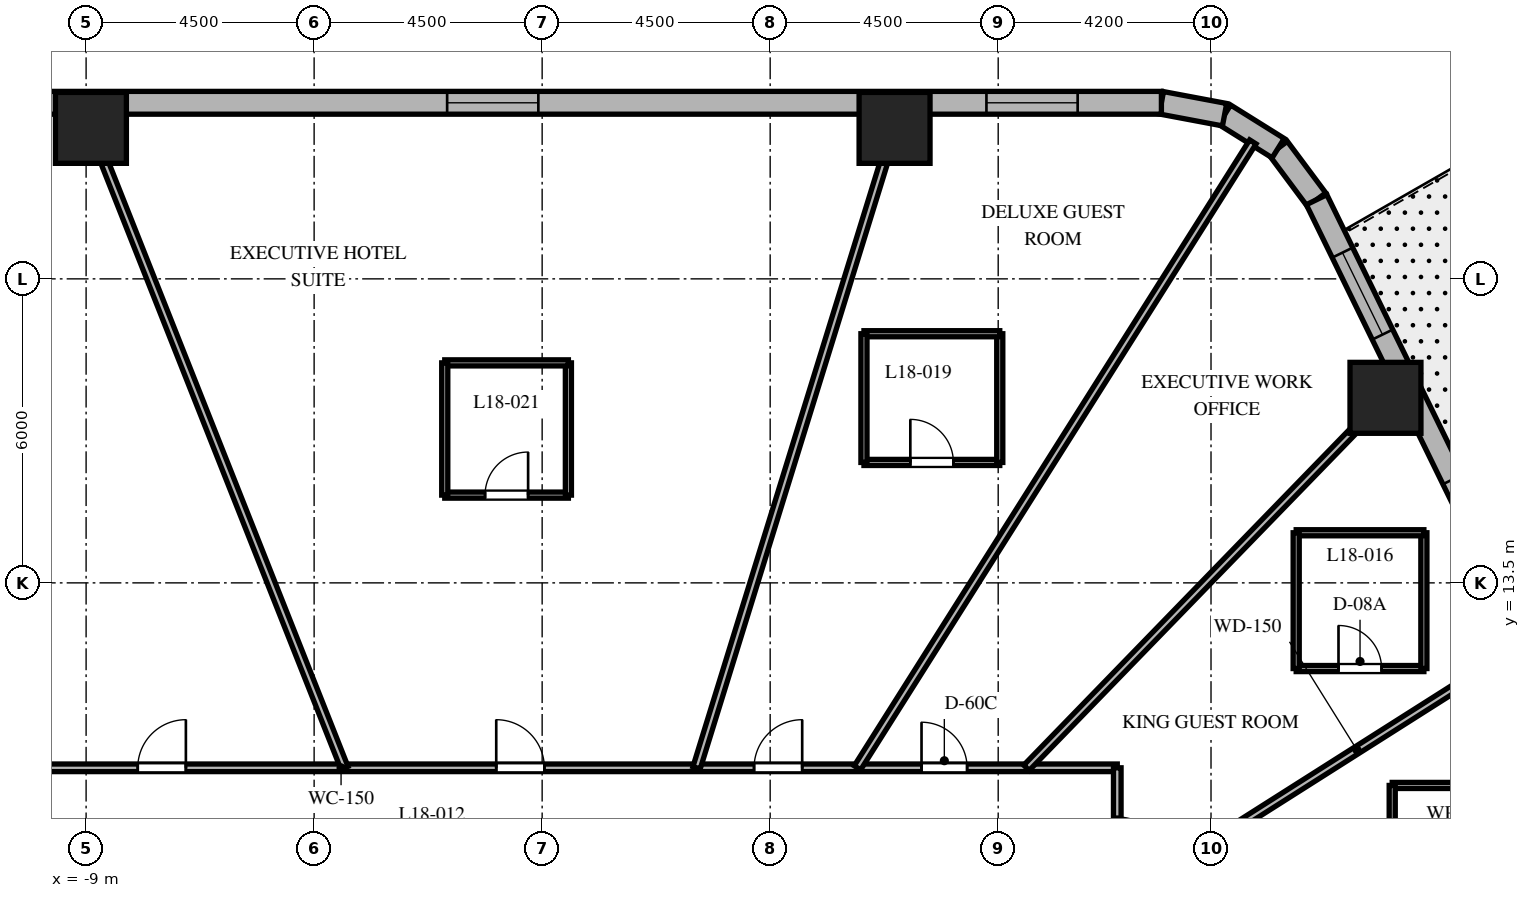
"""IFC4 building model, lengths in metres.
Left out: names, types, materials, properties, quantities, classifications, styles, units other than length and angle.
Written with IfcOpenShell. Run it as: python <this file> out.ifc"""

import sys

from ifc_helpers import new_model, si_unit, direction, frame, frame_2d, origin, origin_2d, place, context, subcontext, project, spatial, rectangle, extrude, element, fill, save


model = new_model("IFC4")
c1 = context("Model", 3, precision=1e-05, world=origin(), true_north=direction((0.0, 1.0)))
c2 = subcontext(c1, "Body", "Model", "MODEL_VIEW")
j1 = project(units=[si_unit("LENGTHUNIT", "METRE"), si_unit("PLANEANGLEUNIT", "RADIAN")], contexts=[c1])
p1 = place(None, origin())
s1 = spatial("IfcSite", under=j1, at=p1, CompositionType="ELEMENT")
p2 = place(p1, origin())
s2 = spatial("IfcBuilding", under=s1, at=p2, CompositionType="ELEMENT")
p3 = place(p2, frame((0.0, 0.0, 78.6)))
s3 = spatial("IfcBuildingStorey", under=s2, at=p3, CompositionType="ELEMENT", Elevation=78.6)
for number, where, z_axis, x_axis in (
    (1, (16.643, 17.152, 0.0), (0.0, 0.0, 1.0), (1.0, 0.0, 0.0)),
    (2, (6.955, 22.48, 0.0), (0.0, 0.0, 1.0), (1.0, 0.0, 0.0)),
    (3, (-8.905, 22.48, 0.0), (0.0, 0.0, 1.0), (1.0, 0.0, 0.0)),
):
    element("IfcColumn", number, at=place(p3, frame(where, z_axis=z_axis, x_axis=x_axis)), inside=s3, PredefinedType="COLUMN", context=c2, shape_type="SweptSolid", body=[
        extrude(rectangle(XDim=1.4, YDim=1.4, at=origin_2d()), origin(), (0.0, 0.0, 1.0), 3.7),
    ])
p4 = place(p3, frame((15.284, 21.062, 0.0), z_axis=(0.0, 0.0, 1.0), x_axis=(-0.597595366449, 0.801797841104, 0.0)))
e4 = element("IfcWall", 4, at=p4, inside=s3, PredefinedType="SOLIDWALL", context=c2, shape_type="SweptSolid", body=[
    extrude(rectangle(XDim=1.269, YDim=0.45, at=frame_2d((0.634, 0.0))), origin(), (0.0, 0.0, 1.0), 3.4),
])
p5 = place(p3, frame((14.526, 22.08, 0.0), z_axis=(0.0, 0.0, 1.0), x_axis=(-0.848185203596, 0.529699783275, 0.0)))
e5 = element("IfcWall", 5, at=p5, inside=s3, PredefinedType="SOLIDWALL", context=c2, shape_type="SweptSolid", body=[
    extrude(rectangle(XDim=1.247, YDim=0.45, at=frame_2d((0.624, 0.0))), origin(), (0.0, 0.0, 1.0), 3.4),
])
p6 = place(p3, frame((13.468, 22.74, 0.0), z_axis=(0.0, 0.0, 1.0), x_axis=(-0.982717174228, 0.185113358451, 0.0)))
e6 = element("IfcWall", 6, at=p6, inside=s3, PredefinedType="SOLIDWALL", context=c2, shape_type="SweptSolid", body=[
    extrude(rectangle(XDim=1.269, YDim=0.45, at=frame_2d((0.634, 0.0))), origin(), (0.0, 0.0, 1.0), 3.4),
])
p7 = place(p3, frame((24.336, 2.532, 0.0), z_axis=(0.0, 0.0, 1.0), x_axis=(-0.438931326393, 0.898520612291, 0.0)))
e7 = element("IfcWall", 7, at=p7, inside=s3, PredefinedType="SOLIDWALL", context=c2, shape_type="SweptSolid", body=[
    extrude(rectangle(XDim=20.623, YDim=0.45, at=frame_2d((10.312, 0.0))), origin(), (0.0, 0.0, 1.0), 3.4),
])
p8 = place(p7, frame((5.171, 0.0, 0.0)))
e8 = element("IfcOpeningElement", 8, at=p8, cuts=e7, PredefinedType="OPENING", context=c2, shape_type="SweptSolid", body=[
    extrude(rectangle(XDim=1.0, YDim=2.15, at=frame_2d((0.5, 1.075))), frame((0.0, 0.235, 0.0), z_axis=(0.0, -1.0, 0.0), x_axis=(1.0, 0.0, 0.0)), (0.0, 0.0, 1.0), 0.47),
])
p9 = place(p7, frame((6.842, 0.0, 0.8)))
e9 = element("IfcOpeningElement", 9, at=p9, cuts=e7, PredefinedType="OPENING", context=c2, shape_type="SweptSolid", body=[
    extrude(rectangle(XDim=1.8, YDim=1.8, at=frame_2d((0.9, 0.9))), frame((0.0, 0.235, 0.0), z_axis=(0.0, -1.0, 0.0), x_axis=(1.0, 0.0, 0.0)), (0.0, 0.0, 1.0), 0.47),
])
p10 = place(p7, frame((12.683, 0.0, 0.8)))
e10 = element("IfcOpeningElement", 10, at=p10, cuts=e7, PredefinedType="OPENING", context=c2, shape_type="SweptSolid", body=[
    extrude(rectangle(XDim=1.8, YDim=1.8, at=frame_2d((0.9, 0.9))), frame((0.0, 0.235, 0.0), z_axis=(0.0, -1.0, 0.0), x_axis=(1.0, 0.0, 0.0)), (0.0, 0.0, 1.0), 0.47),
])
p11 = place(p7, frame((17.66, 0.0, 0.8)))
e11 = element("IfcOpeningElement", 11, at=p11, cuts=e7, PredefinedType="OPENING", context=c2, shape_type="SweptSolid", body=[
    extrude(rectangle(XDim=1.8, YDim=1.8, at=frame_2d((0.9, 0.9))), frame((0.0, 0.235, 0.0), z_axis=(0.0, -1.0, 0.0), x_axis=(1.0, 0.0, 0.0)), (0.0, 0.0, 1.0), 0.47),
])
p12 = place(p7, frame((1.214, 0.0, 0.8)))
e12 = element("IfcOpeningElement", 12, at=p12, cuts=e7, PredefinedType="OPENING", context=c2, shape_type="SweptSolid", body=[
    extrude(rectangle(XDim=1.8, YDim=1.8, at=frame_2d((0.9, 0.9))), frame((0.0, 0.235, 0.0), z_axis=(0.0, -1.0, 0.0), x_axis=(1.0, 0.0, 0.0)), (0.0, 0.0, 1.0), 0.47),
])
p13 = place(p3, frame((12.221, 22.975, 0.0), z_axis=(0.0, 0.0, 1.0), x_axis=(-1.0, 0.0, 0.0)))
e13 = element("IfcWall", 13, at=p13, inside=s3, PredefinedType="SOLIDWALL", context=c2, shape_type="SweptSolid", body=[
    extrude(rectangle(XDim=26.389, YDim=0.45, at=frame_2d((13.195, 0.0))), origin(), (0.0, 0.0, 1.0), 3.4),
])
p14 = place(p13, frame((1.653, 0.0, 0.8)))
e14 = element("IfcOpeningElement", 14, at=p14, cuts=e13, PredefinedType="OPENING", context=c2, shape_type="SweptSolid", body=[
    extrude(rectangle(XDim=1.8, YDim=1.8, at=frame_2d((0.9, 0.9))), frame((0.0, 0.235, 0.0), z_axis=(0.0, -1.0, 0.0), x_axis=(1.0, 0.0, 0.0)), (0.0, 0.0, 1.0), 0.47),
])
p15 = place(p13, frame((12.296, 0.0, 0.8)))
e15 = element("IfcOpeningElement", 15, at=p15, cuts=e13, PredefinedType="OPENING", context=c2, shape_type="SweptSolid", body=[
    extrude(rectangle(XDim=1.8, YDim=1.8, at=frame_2d((0.9, 0.9))), frame((0.0, 0.235, 0.0), z_axis=(0.0, -1.0, 0.0), x_axis=(1.0, 0.0, 0.0)), (0.0, 0.0, 1.0), 0.47),
])
p16 = place(p13, frame((22.938, 0.0, 0.8)))
e16 = element("IfcOpeningElement", 16, at=p16, cuts=e13, PredefinedType="OPENING", context=c2, shape_type="SweptSolid", body=[
    extrude(rectangle(XDim=1.8, YDim=1.8, at=frame_2d((0.9, 0.9))), frame((0.0, 0.235, 0.0), z_axis=(0.0, -1.0, 0.0), x_axis=(1.0, 0.0, 0.0)), (0.0, 0.0, 1.0), 0.47),
])
p17 = place(p3, frame((-11.35, 9.85, 0.0), z_axis=(0.0, 0.0, 1.0), x_axis=(1.0, 0.0, 0.0)))
e17 = element("IfcWall", 17, at=p17, inside=s3, PredefinedType="PARTITIONING", context=c2, shape_type="SweptSolid", body=[
    extrude(rectangle(XDim=22.7, YDim=0.15, at=frame_2d((11.35, 0.0))), origin(), (0.0, 0.0, 1.0), 2.84),
])
p18 = place(p17, frame((18.837, 0.0, 0.0)))
e18 = element("IfcOpeningElement", 18, at=p18, cuts=e17, PredefinedType="OPENING", context=c2, shape_type="SweptSolid", body=[
    extrude(rectangle(XDim=0.9, YDim=2.03, at=frame_2d((0.45, 1.015))), frame((0.0, 0.085, 0.0), z_axis=(0.0, -1.0, 0.0), x_axis=(1.0, 0.0, 0.0)), (0.0, 0.0, 1.0), 0.17),
])
p19 = place(p17, frame((15.532, 0.0, 0.0)))
e19 = element("IfcOpeningElement", 19, at=p19, cuts=e17, PredefinedType="OPENING", context=c2, shape_type="SweptSolid", body=[
    extrude(rectangle(XDim=0.95, YDim=2.03, at=frame_2d((0.475, 1.015))), frame((0.0, 0.085, 0.0), z_axis=(0.0, -1.0, 0.0), x_axis=(1.0, 0.0, 0.0)), (0.0, 0.0, 1.0), 0.17),
])
p20 = place(p17, frame((10.444, 0.0, 0.0)))
e20 = element("IfcOpeningElement", 20, at=p20, cuts=e17, PredefinedType="OPENING", context=c2, shape_type="SweptSolid", body=[
    extrude(rectangle(XDim=0.95, YDim=2.03, at=frame_2d((0.475, 1.015))), frame((0.0, 0.085, 0.0), z_axis=(0.0, -1.0, 0.0), x_axis=(1.0, 0.0, 0.0)), (0.0, 0.0, 1.0), 0.17),
])
p21 = place(p17, frame((3.369, 0.0, 0.0)))
e21 = element("IfcOpeningElement", 21, at=p21, cuts=e17, PredefinedType="OPENING", context=c2, shape_type="SweptSolid", body=[
    extrude(rectangle(XDim=0.95, YDim=2.03, at=frame_2d((0.475, 1.015))), frame((0.0, 0.085, 0.0), z_axis=(0.0, -1.0, 0.0), x_axis=(1.0, 0.0, 0.0)), (0.0, 0.0, 1.0), 0.17),
])
p22 = place(p3, frame((11.35, 9.85, 0.0), z_axis=(0.0, 0.0, 1.0), x_axis=(0.0, -1.0, 0.0)))
e22 = element("IfcWall", 22, at=p22, inside=s3, PredefinedType="PARTITIONING", context=c2, shape_type="SweptSolid", body=[
    extrude(rectangle(XDim=19.7, YDim=0.15, at=frame_2d((9.85, 0.0))), origin(), (0.0, 0.0, 1.0), 2.84),
])
p23 = place(p22, frame((4.208, 0.0, 0.0)))
e23 = element("IfcOpeningElement", 23, at=p23, cuts=e22, PredefinedType="OPENING", context=c2, shape_type="SweptSolid", body=[
    extrude(rectangle(XDim=0.95, YDim=2.03, at=frame_2d((0.475, 1.015))), frame((0.0, 0.085, 0.0), z_axis=(0.0, -1.0, 0.0), x_axis=(1.0, 0.0, 0.0)), (0.0, 0.0, 1.0), 0.17),
])
p24 = place(p22, frame((0.97, 0.0, 0.0)))
e24 = element("IfcOpeningElement", 24, at=p24, cuts=e22, PredefinedType="OPENING", context=c2, shape_type="SweptSolid", body=[
    extrude(rectangle(XDim=0.95, YDim=2.03, at=frame_2d((0.475, 1.015))), frame((0.0, 0.085, 0.0), z_axis=(0.0, -1.0, 0.0), x_axis=(1.0, 0.0, 0.0)), (0.0, 0.0, 1.0), 0.17),
])
p25 = place(p22, frame((17.181, 0.0, 0.0)))
e25 = element("IfcOpeningElement", 25, at=p25, cuts=e22, PredefinedType="OPENING", context=c2, shape_type="SweptSolid", body=[
    extrude(rectangle(XDim=0.95, YDim=2.03, at=frame_2d((0.475, 1.015))), frame((0.0, 0.085, 0.0), z_axis=(0.0, -1.0, 0.0), x_axis=(1.0, 0.0, 0.0)), (0.0, 0.0, 1.0), 0.17),
])
p26 = place(p22, frame((13.403, 0.0, 0.0)))
e26 = element("IfcOpeningElement", 26, at=p26, cuts=e22, PredefinedType="OPENING", context=c2, shape_type="SweptSolid", body=[
    extrude(rectangle(XDim=0.95, YDim=2.03, at=frame_2d((0.475, 1.015))), frame((0.0, 0.085, 0.0), z_axis=(0.0, -1.0, 0.0), x_axis=(1.0, 0.0, 0.0)), (0.0, 0.0, 1.0), 0.17),
])
p27 = place(p22, frame((8.838, 0.0, 0.0)))
e27 = element("IfcOpeningElement", 27, at=p27, cuts=e22, PredefinedType="OPENING", context=c2, shape_type="SweptSolid", body=[
    extrude(rectangle(XDim=0.95, YDim=2.03, at=frame_2d((0.475, 1.015))), frame((0.0, 0.085, 0.0), z_axis=(0.0, -1.0, 0.0), x_axis=(1.0, 0.0, 0.0)), (0.0, 0.0, 1.0), 0.17),
])
p28 = place(p3, frame((11.35, 7.199, 0.0), z_axis=(0.0, 0.0, 1.0), x_axis=(0.844458213289, 0.535621439087, 0.0)))
e28 = element("IfcWall", 28, at=p28, inside=s3, PredefinedType="PARTITIONING", context=c2, shape_type="SweptSolid", body=[
    extrude(rectangle(XDim=9.679, YDim=0.15, at=frame_2d((4.84, 0.0))), origin(), (0.0, 0.0, 1.0), 2.54),
])
p29 = place(p3, frame((9.558, 9.85, 0.0), z_axis=(0.0, 0.0, 1.0), x_axis=(0.69638346089, 0.717669893056, 0.0)))
e29 = element("IfcWall", 29, at=p29, inside=s3, PredefinedType="PARTITIONING", context=c2, shape_type="SweptSolid", body=[
    extrude(rectangle(XDim=10.701, YDim=0.15, at=frame_2d((5.351, 0.0))), origin(), (0.0, 0.0, 1.0), 2.54),
])
p30 = place(p3, frame((6.222, 9.85, 0.0), z_axis=(0.0, 0.0, 1.0), x_axis=(0.534069056435, 0.845440857162, 0.0)))
e30 = element("IfcWall", 30, at=p30, inside=s3, PredefinedType="PARTITIONING", context=c2, shape_type="SweptSolid", body=[
    extrude(rectangle(XDim=14.611, YDim=0.15, at=frame_2d((7.306, 0.0))), origin(), (0.0, 0.0, 1.0), 2.54),
])
p31 = place(p3, frame((3.048, 9.85, 0.0), z_axis=(0.0, 0.0, 1.0), x_axis=(0.295553992761, 0.955326037206, 0.0)))
e31 = element("IfcWall", 31, at=p31, inside=s3, PredefinedType="PARTITIONING", context=c2, shape_type="SweptSolid", body=[
    extrude(rectangle(XDim=13.739, YDim=0.15, at=frame_2d((6.869, 0.0))), origin(), (0.0, 0.0, 1.0), 2.54),
])
p32 = place(p3, frame((-3.902, 9.85, 0.0), z_axis=(0.0, 0.0, 1.0), x_axis=(-0.36828765711, 0.929711891728, 0.0)))
e32 = element("IfcWall", 32, at=p32, inside=s3, PredefinedType="PARTITIONING", context=c2, shape_type="SweptSolid", body=[
    extrude(rectangle(XDim=14.117, YDim=0.15, at=frame_2d((7.059, 0.0))), origin(), (0.0, 0.0, 1.0), 2.54),
])
p33 = place(p3, frame((19.216, 9.502, 0.0), z_axis=(0.0, 0.0, 1.0), x_axis=(-1.0, 0.0, 0.0)))
e33 = element("IfcWall", 33, at=p33, inside=s3, PredefinedType="PARTITIONING", context=c2, shape_type="SweptSolid", body=[
    extrude(rectangle(XDim=2.44, YDim=0.12, at=frame_2d((1.22, 0.0))), origin(), (0.0, 0.0, 1.0), 3.4),
])
p34 = place(p3, frame((16.776, 9.502, 0.0), z_axis=(0.0, 0.0, 1.0), x_axis=(0.0, -1.0, 0.0)))
e34 = element("IfcWall", 34, at=p34, inside=s3, PredefinedType="PARTITIONING", context=c2, shape_type="SweptSolid", body=[
    extrude(rectangle(XDim=2.61, YDim=0.12, at=frame_2d((1.305, 0.0))), origin(), (0.0, 0.0, 1.0), 2.927),
])
p35 = place(p3, frame((14.881, 11.809, 0.0), z_axis=(0.0, 0.0, 1.0), x_axis=(1.0, 0.0, 0.0)))
e35 = element("IfcWall", 35, at=p35, inside=s3, PredefinedType="PARTITIONING", context=c2, shape_type="SweptSolid", body=[
    extrude(rectangle(XDim=2.52, YDim=0.12, at=frame_2d((1.26, 0.0))), origin(), (0.0, 0.0, 1.0), 2.927),
])
p36 = place(p35, frame((0.835, 0.0, 0.0)))
e36 = element("IfcOpeningElement", 36, at=p36, cuts=e35, PredefinedType="OPENING", context=c2, shape_type="SweptSolid", body=[
    extrude(rectangle(XDim=0.85, YDim=2.03, at=frame_2d((0.425, 1.015))), frame((0.0, 0.07, 0.0), z_axis=(0.0, -1.0, 0.0), x_axis=(1.0, 0.0, 0.0)), (0.0, 0.0, 1.0), 0.14),
])
p37 = place(p3, frame((17.401, 11.809, 0.0), z_axis=(0.0, 0.0, 1.0), x_axis=(0.0, 1.0, 0.0)))
e37 = element("IfcWall", 37, at=p37, inside=s3, PredefinedType="PARTITIONING", context=c2, shape_type="SweptSolid", body=[
    extrude(rectangle(XDim=2.68, YDim=0.12, at=frame_2d((1.34, 0.0))), origin(), (0.0, 0.0, 1.0), 3.4),
])
p38 = place(p3, frame((17.401, 14.489, 0.0), z_axis=(0.0, 0.0, 1.0), x_axis=(-1.0, 0.0, 0.0)))
e38 = element("IfcWall", 38, at=p38, inside=s3, PredefinedType="PARTITIONING", context=c2, shape_type="SweptSolid", body=[
    extrude(rectangle(XDim=2.52, YDim=0.12, at=frame_2d((1.26, 0.0))), origin(), (0.0, 0.0, 1.0), 3.4),
])
p39 = place(p3, frame((14.881, 14.489, 0.0), z_axis=(0.0, 0.0, 1.0), x_axis=(0.0, -1.0, 0.0)))
e39 = element("IfcWall", 39, at=p39, inside=s3, PredefinedType="PARTITIONING", context=c2, shape_type="SweptSolid", body=[
    extrude(rectangle(XDim=2.68, YDim=0.12, at=frame_2d((1.34, 0.0))), origin(), (0.0, 0.0, 1.0), 2.927),
])
p40 = place(p3, frame((6.351, 15.877, 0.0), z_axis=(0.0, 0.0, 1.0), x_axis=(1.0, 0.0, 0.0)))
e40 = element("IfcWall", 40, at=p40, inside=s3, PredefinedType="PARTITIONING", context=c2, shape_type="SweptSolid", body=[
    extrude(rectangle(XDim=2.68, YDim=0.12, at=frame_2d((1.34, 0.0))), origin(), (0.0, 0.0, 1.0), 2.84),
])
p41 = place(p40, frame((0.915, 0.0, 0.0)))
e41 = element("IfcOpeningElement", 41, at=p41, cuts=e40, PredefinedType="OPENING", context=c2, shape_type="SweptSolid", body=[
    extrude(rectangle(XDim=0.85, YDim=2.03, at=frame_2d((0.425, 1.015))), frame((0.0, 0.07, 0.0), z_axis=(0.0, -1.0, 0.0), x_axis=(1.0, 0.0, 0.0)), (0.0, 0.0, 1.0), 0.14),
])
p42 = place(p3, frame((9.031, 15.877, 0.0), z_axis=(0.0, 0.0, 1.0), x_axis=(0.0, 1.0, 0.0)))
e42 = element("IfcWall", 42, at=p42, inside=s3, PredefinedType="PARTITIONING", context=c2, shape_type="SweptSolid", body=[
    extrude(rectangle(XDim=2.54, YDim=0.12, at=frame_2d((1.27, 0.0))), origin(), (0.0, 0.0, 1.0), 2.972),
])
p43 = place(p3, frame((9.031, 18.417, 0.0), z_axis=(0.0, 0.0, 1.0), x_axis=(-1.0, 0.0, 0.0)))
e43 = element("IfcWall", 43, at=p43, inside=s3, PredefinedType="PARTITIONING", context=c2, shape_type="SweptSolid", body=[
    extrude(rectangle(XDim=2.68, YDim=0.12, at=frame_2d((1.34, 0.0))), origin(), (0.0, 0.0, 1.0), 2.84),
])
p44 = place(p3, frame((6.351, 18.417, 0.0), z_axis=(0.0, 0.0, 1.0), x_axis=(0.0, -1.0, 0.0)))
e44 = element("IfcWall", 44, at=p44, inside=s3, PredefinedType="PARTITIONING", context=c2, shape_type="SweptSolid", body=[
    extrude(rectangle(XDim=2.54, YDim=0.12, at=frame_2d((1.27, 0.0))), origin(), (0.0, 0.0, 1.0), 2.84),
])
p45 = place(p3, frame((-1.922, 15.232, 0.0), z_axis=(0.0, 0.0, 1.0), x_axis=(1.0, 0.0, 0.0)))
e45 = element("IfcWall", 45, at=p45, inside=s3, PredefinedType="PARTITIONING", context=c2, shape_type="SweptSolid", body=[
    extrude(rectangle(XDim=2.44, YDim=0.12, at=frame_2d((1.22, 0.0))), origin(), (0.0, 0.0, 1.0), 3.4),
])
p46 = place(p45, frame((0.795, 0.0, 0.0)))
e46 = element("IfcOpeningElement", 46, at=p46, cuts=e45, PredefinedType="OPENING", context=c2, shape_type="SweptSolid", body=[
    extrude(rectangle(XDim=0.85, YDim=2.03, at=frame_2d((0.425, 1.015))), frame((0.0, 0.07, 0.0), z_axis=(0.0, -1.0, 0.0), x_axis=(1.0, 0.0, 0.0)), (0.0, 0.0, 1.0), 0.14),
])
p47 = place(p3, frame((0.518, 15.232, 0.0), z_axis=(0.0, 0.0, 1.0), x_axis=(0.0, 1.0, 0.0)))
e47 = element("IfcWall", 47, at=p47, inside=s3, PredefinedType="PARTITIONING", context=c2, shape_type="SweptSolid", body=[
    extrude(rectangle(XDim=2.61, YDim=0.12, at=frame_2d((1.305, 0.0))), origin(), (0.0, 0.0, 1.0), 2.84),
])
p48 = place(p3, frame((0.518, 17.842, 0.0), z_axis=(0.0, 0.0, 1.0), x_axis=(-1.0, 0.0, 0.0)))
e48 = element("IfcWall", 48, at=p48, inside=s3, PredefinedType="PARTITIONING", context=c2, shape_type="SweptSolid", body=[
    extrude(rectangle(XDim=2.44, YDim=0.12, at=frame_2d((1.22, 0.0))), origin(), (0.0, 0.0, 1.0), 2.84),
])
p49 = place(p3, frame((-1.922, 17.842, 0.0), z_axis=(0.0, 0.0, 1.0), x_axis=(0.0, -1.0, 0.0)))
e49 = element("IfcWall", 49, at=p49, inside=s3, PredefinedType="PARTITIONING", context=c2, shape_type="SweptSolid", body=[
    extrude(rectangle(XDim=2.61, YDim=0.12, at=frame_2d((1.305, 0.0))), origin(), (0.0, 0.0, 1.0), 2.84),
])
p50 = place(p11, origin())
e50 = element("IfcWindow", 50, at=p50, inside=s3, PartitioningType="SINGLE_PANEL", PredefinedType="WINDOW", context=c2, shape_type="SweptSolid", body=[
    extrude(rectangle(XDim=1.8, YDim=1.8, at=frame_2d((0.9, 0.9))), frame((0.0, 0.03, 0.0), z_axis=(0.0, -1.0, 0.0), x_axis=(1.0, 0.0, 0.0)), (0.0, 0.0, 1.0), 0.06),
])
fill(e11, e50)
p51 = place(p14, origin())
e51 = element("IfcWindow", 51, at=p51, inside=s3, PartitioningType="SINGLE_PANEL", PredefinedType="WINDOW", context=c2, shape_type="SweptSolid", body=[
    extrude(rectangle(XDim=1.8, YDim=1.8, at=frame_2d((0.9, 0.9))), frame((0.0, 0.03, 0.0), z_axis=(0.0, -1.0, 0.0), x_axis=(1.0, 0.0, 0.0)), (0.0, 0.0, 1.0), 0.06),
])
fill(e14, e51)
p52 = place(p15, origin())
e52 = element("IfcWindow", 52, at=p52, inside=s3, PartitioningType="SINGLE_PANEL", PredefinedType="WINDOW", context=c2, shape_type="SweptSolid", body=[
    extrude(rectangle(XDim=1.8, YDim=1.8, at=frame_2d((0.9, 0.9))), frame((0.0, 0.03, 0.0), z_axis=(0.0, -1.0, 0.0), x_axis=(1.0, 0.0, 0.0)), (0.0, 0.0, 1.0), 0.06),
])
fill(e15, e52)
p53 = place(p24, origin())
e53 = element("IfcDoor", 53, at=p53, inside=s3, OperationType="SINGLE_SWING_RIGHT", PredefinedType="DOOR", context=c2, shape_type="SweptSolid", body=[
    extrude(rectangle(XDim=0.95, YDim=2.03, at=frame_2d((0.475, 1.015))), frame((0.0, 0.025, 0.0), z_axis=(0.0, -1.0, 0.0), x_axis=(1.0, 0.0, 0.0)), (0.0, 0.0, 1.0), 0.05),
])
fill(e24, e53)
p54 = place(p36, origin())
e54 = element("IfcDoor", 54, at=p54, inside=s3, OperationType="SINGLE_SWING_LEFT", PredefinedType="DOOR", context=c2, shape_type="SweptSolid", body=[
    extrude(rectangle(XDim=0.85, YDim=2.03, at=frame_2d((0.425, 1.015))), frame((0.0, 0.025, 0.0), z_axis=(0.0, -1.0, 0.0), x_axis=(1.0, 0.0, 0.0)), (0.0, 0.0, 1.0), 0.05),
])
fill(e36, e54)
p55 = place(p18, origin())
e55 = element("IfcDoor", 55, at=p55, inside=s3, OperationType="SINGLE_SWING_LEFT", PredefinedType="DOOR", context=c2, shape_type="SweptSolid", body=[
    extrude(rectangle(XDim=0.9, YDim=2.03, at=frame_2d((0.45, 1.015))), frame((0.0, 0.025, 0.0), z_axis=(0.0, -1.0, 0.0), x_axis=(1.0, 0.0, 0.0)), (0.0, 0.0, 1.0), 0.05),
])
fill(e18, e55)
p56 = place(p19, origin())
e56 = element("IfcDoor", 56, at=p56, inside=s3, OperationType="SINGLE_SWING_RIGHT", PredefinedType="DOOR", context=c2, shape_type="SweptSolid", body=[
    extrude(rectangle(XDim=0.95, YDim=2.03, at=frame_2d((0.475, 1.015))), frame((0.0, 0.025, 0.0), z_axis=(0.0, -1.0, 0.0), x_axis=(1.0, 0.0, 0.0)), (0.0, 0.0, 1.0), 0.05),
])
fill(e19, e56)
p57 = place(p41, origin())
e57 = element("IfcDoor", 57, at=p57, inside=s3, OperationType="SINGLE_SWING_LEFT", PredefinedType="DOOR", context=c2, shape_type="SweptSolid", body=[
    extrude(rectangle(XDim=0.85, YDim=2.03, at=frame_2d((0.425, 1.015))), frame((0.0, 0.025, 0.0), z_axis=(0.0, -1.0, 0.0), x_axis=(1.0, 0.0, 0.0)), (0.0, 0.0, 1.0), 0.05),
])
fill(e41, e57)
p58 = place(p20, origin())
e58 = element("IfcDoor", 58, at=p58, inside=s3, OperationType="SINGLE_SWING_LEFT", PredefinedType="DOOR", context=c2, shape_type="SweptSolid", body=[
    extrude(rectangle(XDim=0.95, YDim=2.03, at=frame_2d((0.475, 1.015))), frame((0.0, 0.025, 0.0), z_axis=(0.0, -1.0, 0.0), x_axis=(1.0, 0.0, 0.0)), (0.0, 0.0, 1.0), 0.05),
])
fill(e20, e58)
p59 = place(p46, origin())
e59 = element("IfcDoor", 59, at=p59, inside=s3, OperationType="SINGLE_SWING_RIGHT", PredefinedType="DOOR", context=c2, shape_type="SweptSolid", body=[
    extrude(rectangle(XDim=0.85, YDim=2.03, at=frame_2d((0.425, 1.015))), frame((0.0, 0.025, 0.0), z_axis=(0.0, -1.0, 0.0), x_axis=(1.0, 0.0, 0.0)), (0.0, 0.0, 1.0), 0.05),
])
fill(e46, e59)
p60 = place(p21, origin())
e60 = element("IfcDoor", 60, at=p60, inside=s3, OperationType="SINGLE_SWING_RIGHT", PredefinedType="DOOR", context=c2, shape_type="SweptSolid", body=[
    extrude(rectangle(XDim=0.95, YDim=2.03, at=frame_2d((0.475, 1.015))), frame((0.0, 0.025, 0.0), z_axis=(0.0, -1.0, 0.0), x_axis=(1.0, 0.0, 0.0)), (0.0, 0.0, 1.0), 0.05),
])
fill(e21, e60)
save(model, sys.argv[1])
